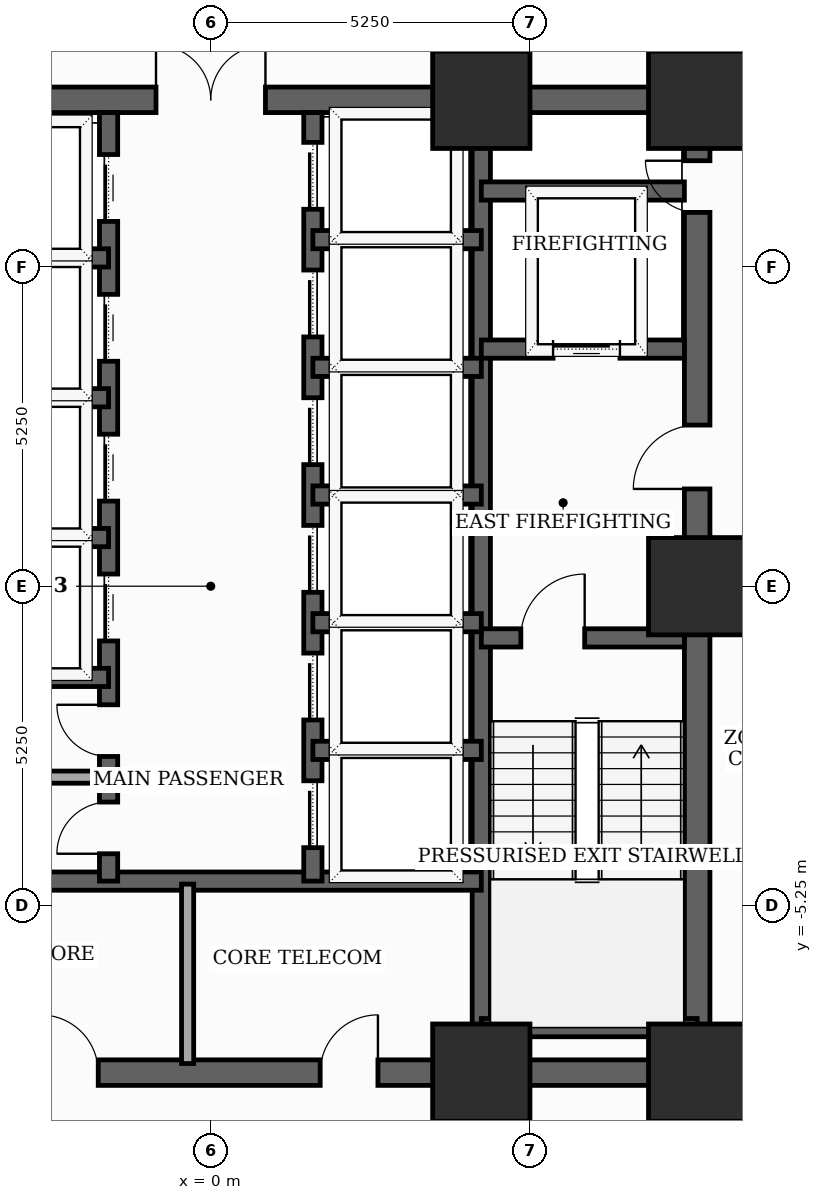
"""IFC4 building model, lengths in metres.
Left out: names, types, materials, properties, quantities, classifications, styles, units other than length and angle.
Written with IfcOpenShell. Run it as: python <this file> out.ifc"""

import sys

from ifc_helpers import new_model, si_unit, direction, frame, frame_2d, origin, origin_2d, place, context, subcontext, project, spatial, rectangle, extrude, element, fill, save


model = new_model("IFC4")
c1 = context("Model", 3, precision=1e-05, world=origin(), true_north=direction((0.0, 1.0)))
c2 = subcontext(c1, "Body", "Model", "MODEL_VIEW")
j1 = project(units=[si_unit("LENGTHUNIT", "METRE"), si_unit("PLANEANGLEUNIT", "RADIAN")], contexts=[c1])
p1 = place(None, origin())
s1 = spatial("IfcSite", under=j1, at=p1, CompositionType="ELEMENT")
p2 = place(p1, origin())
s2 = spatial("IfcBuilding", under=s1, at=p2, CompositionType="ELEMENT")
p3 = place(p2, frame((0.0, 0.0, 37.1)))
s3 = spatial("IfcBuildingStorey", under=s2, at=p3, CompositionType="ELEMENT", Elevation=37.1)
for number, where, z_axis, x_axis in (
    (1, (4.45, -8.0, 0.0), (0.0, 0.0, 1.0), (1.0, 0.0, 0.0)),
    (2, (8.0, -8.0, 0.0), (0.0, 0.0, 1.0), (1.0, 0.0, 0.0)),
    (3, (8.0, 0.0, 0.0), (0.0, 0.0, 1.0), (1.0, 0.0, 0.0)),
    (4, (8.0, 8.0, 0.0), (0.0, 0.0, 1.0), (1.0, 0.0, 0.0)),
    (5, (4.45, 8.0, 0.0), (0.0, 0.0, 1.0), (1.0, 0.0, 0.0)),
):
    element("IfcColumn", number, at=place(p3, frame(where, z_axis=z_axis, x_axis=x_axis)), inside=s3, PredefinedType="COLUMN", context=c2, shape_type="SweptSolid", body=[
        extrude(rectangle(XDim=1.6, YDim=1.6, at=origin_2d()), origin(), (0.0, 0.0, 1.0), 3.7),
    ])
p4 = place(p3, frame((8.0, -8.0, 0.0), z_axis=(0.0, 0.0, 1.0), x_axis=(0.0, 1.0, 0.0)))
e6 = element("IfcWall", 6, at=p4, inside=s3, PredefinedType="SHEAR", context=c2, shape_type="SweptSolid", body=[
    extrude(rectangle(XDim=16.0, YDim=0.42, at=frame_2d((8.0, 0.0))), origin(), (0.0, 0.0, 1.0), 3.5),
])
p5 = place(p4, frame((9.6, 0.0, 0.0)))
e7 = element("IfcOpeningElement", 7, at=p5, cuts=e6, PredefinedType="OPENING", context=c2, shape_type="SweptSolid", body=[
    extrude(rectangle(XDim=1.05, YDim=2.15, at=frame_2d((0.525, 1.075))), frame((0.0, 0.22, 0.0), z_axis=(0.0, -1.0, 0.0), x_axis=(1.0, 0.0, 0.0)), (0.0, 0.0, 1.0), 0.44),
])
p6 = place(p4, frame((14.148, 0.0, 0.0)))
e8 = element("IfcOpeningElement", 8, at=p6, cuts=e6, PredefinedType="OPENING", context=c2, shape_type="SweptSolid", body=[
    extrude(rectangle(XDim=0.85, YDim=2.02, at=frame_2d((0.425, 1.01))), frame((0.0, 0.22, 0.0), z_axis=(0.0, -1.0, 0.0), x_axis=(1.0, 0.0, 0.0)), (0.0, 0.0, 1.0), 0.44),
])
p7 = place(p3, frame((-8.0, -8.0, 0.0), z_axis=(0.0, 0.0, 1.0), x_axis=(1.0, 0.0, 0.0)))
e9 = element("IfcWall", 9, at=p7, inside=s3, PredefinedType="SHEAR", context=c2, shape_type="SweptSolid", body=[
    extrude(rectangle(XDim=16.0, YDim=0.42, at=frame_2d((8.0, 0.0))), origin(), (0.0, 0.0, 1.0), 3.5),
])
p8 = place(p7, frame((5.2, 0.0, 0.0)))
e10 = element("IfcOpeningElement", 10, at=p8, cuts=e9, PredefinedType="OPENING", context=c2, shape_type="SweptSolid", body=[
    extrude(rectangle(XDim=0.95, YDim=2.1, at=frame_2d((0.475, 1.05))), frame((0.0, 0.22, 0.0), z_axis=(0.0, -1.0, 0.0), x_axis=(1.0, 0.0, 0.0)), (0.0, 0.0, 1.0), 0.44),
])
p9 = place(p7, frame((9.8, 0.0, 0.0)))
e11 = element("IfcOpeningElement", 11, at=p9, cuts=e9, PredefinedType="OPENING", context=c2, shape_type="SweptSolid", body=[
    extrude(rectangle(XDim=0.95, YDim=2.1, at=frame_2d((0.475, 1.05))), frame((0.0, 0.22, 0.0), z_axis=(0.0, -1.0, 0.0), x_axis=(1.0, 0.0, 0.0)), (0.0, 0.0, 1.0), 0.44),
])
p10 = place(p3, frame((-8.0, 8.0, 0.0), z_axis=(0.0, 0.0, 1.0), x_axis=(1.0, 0.0, 0.0)))
e12 = element("IfcWall", 12, at=p10, inside=s3, PredefinedType="SHEAR", context=c2, shape_type="SweptSolid", body=[
    extrude(rectangle(XDim=16.0, YDim=0.42, at=frame_2d((8.0, 0.0))), origin(), (0.0, 0.0, 1.0), 3.5),
])
p11 = place(p10, frame((7.1, 0.0, 0.0)))
e13 = element("IfcOpeningElement", 13, at=p11, cuts=e12, PredefinedType="OPENING", context=c2, shape_type="SweptSolid", body=[
    extrude(rectangle(XDim=1.8, YDim=2.15, at=frame_2d((0.9, 1.075))), frame((0.0, 0.22, 0.0), z_axis=(0.0, -1.0, 0.0), x_axis=(1.0, 0.0, 0.0)), (0.0, 0.0, 1.0), 0.44),
])
p12 = place(p3, frame((4.45, -7.79, 0.0), z_axis=(0.0, 0.0, 1.0), x_axis=(0.0, 1.0, 0.0)))
e14 = element("IfcWall", 14, at=p12, inside=s3, PredefinedType="SHEAR", context=c2, shape_type="SweptSolid", body=[
    extrude(rectangle(XDim=15.58, YDim=0.3, at=frame_2d((7.79, 0.0))), origin(), (0.0, 0.0, 1.0), 3.5),
])
p13 = place(p3, frame((4.45, -0.85, 0.0), z_axis=(0.0, 0.0, 1.0), x_axis=(1.0, 0.0, 0.0)))
e15 = element("IfcWall", 15, at=p13, inside=s3, PredefinedType="SHEAR", context=c2, shape_type="SweptSolid", body=[
    extrude(rectangle(XDim=3.34, YDim=0.3, at=frame_2d((1.67, 0.0))), origin(), (0.0, 0.0, 1.0), 3.5),
])
p14 = place(p13, frame((0.65, 0.0, 0.0)))
e16 = element("IfcOpeningElement", 16, at=p14, cuts=e15, PredefinedType="OPENING", context=c2, shape_type="SweptSolid", body=[
    extrude(rectangle(XDim=1.05, YDim=2.15, at=frame_2d((0.525, 1.075))), frame((0.0, 0.16, 0.0), z_axis=(0.0, -1.0, 0.0), x_axis=(1.0, 0.0, 0.0)), (0.0, 0.0, 1.0), 0.32),
])
p15 = place(p3, frame((4.45, -7.26, 0.0), z_axis=(0.0, 0.0, 1.0), x_axis=(1.0, 0.0, 0.0)))
e17 = element("IfcWall", 17, at=p15, inside=s3, PredefinedType="SHEAR", context=c2, shape_type="SweptSolid", body=[
    extrude(rectangle(XDim=3.55, YDim=0.3, at=frame_2d((1.775, 0.0))), origin(), (0.0, 0.0, 1.0), 3.5),
])
p16 = place(p3, frame((4.45, 3.9, 0.0), z_axis=(0.0, 0.0, 1.0), x_axis=(1.0, 0.0, 0.0)))
e18 = element("IfcWall", 18, at=p16, inside=s3, PredefinedType="SHEAR", context=c2, shape_type="SweptSolid", body=[
    extrude(rectangle(XDim=3.34, YDim=0.3, at=frame_2d((1.67, 0.0))), origin(), (0.0, 0.0, 1.0), 3.5),
])
p17 = place(p16, frame((1.18, 0.0, 0.0)))
e19 = element("IfcOpeningElement", 19, at=p17, cuts=e18, PredefinedType="OPENING", context=c2, shape_type="SweptSolid", body=[
    extrude(rectangle(XDim=1.1, YDim=2.1, at=frame_2d((0.55, 1.05))), frame((0.0, 0.16, 0.0), z_axis=(0.0, -1.0, 0.0), x_axis=(1.0, 0.0, 0.0)), (0.0, 0.0, 1.0), 0.32),
])
p18 = place(p3, frame((4.45, 6.5, 0.0), z_axis=(0.0, 0.0, 1.0), x_axis=(1.0, 0.0, 0.0)))
e20 = element("IfcWall", 20, at=p18, inside=s3, PredefinedType="SHEAR", context=c2, shape_type="SweptSolid", body=[
    extrude(rectangle(XDim=3.34, YDim=0.3, at=frame_2d((1.67, 0.0))), origin(), (0.0, 0.0, 1.0), 3.5),
])
p19 = place(p3, frame((-4.45, -4.85, 0.0), z_axis=(0.0, 0.0, 1.0), x_axis=(1.0, 0.0, 0.0)))
e21 = element("IfcWall", 21, at=p19, inside=s3, PredefinedType="SHEAR", context=c2, shape_type="SweptSolid", body=[
    extrude(rectangle(XDim=8.9, YDim=0.3, at=frame_2d((4.45, 0.0))), origin(), (0.0, 0.0, 1.0), 3.5),
])
p20 = place(p3, frame((-1.68, -4.85, 0.0), z_axis=(0.0, 0.0, 1.0), x_axis=(0.0, 1.0, 0.0)))
e22 = element("IfcWall", 22, at=p20, inside=s3, PredefinedType="SHEAR", context=c2, shape_type="SweptSolid", body=[
    extrude(rectangle(XDim=12.64, YDim=0.3, at=frame_2d((6.32, 0.0))), origin(), (0.0, 0.0, 1.0), 3.5),
])
p21 = place(p20, frame((3.95, 0.0, 0.0)))
e23 = element("IfcOpeningElement", 23, at=p21, cuts=e22, PredefinedType="OPENING", context=c2, shape_type="SweptSolid", body=[
    extrude(rectangle(XDim=1.1, YDim=2.1, at=frame_2d((0.55, 1.05))), frame((0.0, 0.16, 0.0), z_axis=(0.0, -1.0, 0.0), x_axis=(1.0, 0.0, 0.0)), (0.0, 0.0, 1.0), 0.32),
])
p22 = place(p20, frame((6.25, 0.0, 0.0)))
e24 = element("IfcOpeningElement", 24, at=p22, cuts=e22, PredefinedType="OPENING", context=c2, shape_type="SweptSolid", body=[
    extrude(rectangle(XDim=1.1, YDim=2.1, at=frame_2d((0.55, 1.05))), frame((0.0, 0.16, 0.0), z_axis=(0.0, -1.0, 0.0), x_axis=(1.0, 0.0, 0.0)), (0.0, 0.0, 1.0), 0.32),
])
p23 = place(p20, frame((8.55, 0.0, 0.0)))
e25 = element("IfcOpeningElement", 25, at=p23, cuts=e22, PredefinedType="OPENING", context=c2, shape_type="SweptSolid", body=[
    extrude(rectangle(XDim=1.1, YDim=2.1, at=frame_2d((0.55, 1.05))), frame((0.0, 0.16, 0.0), z_axis=(0.0, -1.0, 0.0), x_axis=(1.0, 0.0, 0.0)), (0.0, 0.0, 1.0), 0.32),
])
p24 = place(p20, frame((10.85, 0.0, 0.0)))
e26 = element("IfcOpeningElement", 26, at=p24, cuts=e22, PredefinedType="OPENING", context=c2, shape_type="SweptSolid", body=[
    extrude(rectangle(XDim=1.1, YDim=2.1, at=frame_2d((0.55, 1.05))), frame((0.0, 0.16, 0.0), z_axis=(0.0, -1.0, 0.0), x_axis=(1.0, 0.0, 0.0)), (0.0, 0.0, 1.0), 0.32),
])
p25 = place(p20, frame((0.45, 0.0, 0.0)))
e27 = element("IfcOpeningElement", 27, at=p25, cuts=e22, PredefinedType="OPENING", context=c2, shape_type="SweptSolid", body=[
    extrude(rectangle(XDim=0.85, YDim=2.02, at=frame_2d((0.425, 1.01))), frame((0.0, 0.16, 0.0), z_axis=(0.0, -1.0, 0.0), x_axis=(1.0, 0.0, 0.0)), (0.0, 0.0, 1.0), 0.32),
])
p26 = place(p20, frame((2.05, 0.0, 0.0)))
e28 = element("IfcOpeningElement", 28, at=p26, cuts=e22, PredefinedType="OPENING", context=c2, shape_type="SweptSolid", body=[
    extrude(rectangle(XDim=0.85, YDim=2.02, at=frame_2d((0.425, 1.01))), frame((0.0, 0.16, 0.0), z_axis=(0.0, -1.0, 0.0), x_axis=(1.0, 0.0, 0.0)), (0.0, 0.0, 1.0), 0.32),
])
p27 = place(p3, frame((1.68, -4.85, 0.0), z_axis=(0.0, 0.0, 1.0), x_axis=(0.0, 1.0, 0.0)))
e29 = element("IfcWall", 29, at=p27, inside=s3, PredefinedType="SHEAR", context=c2, shape_type="SweptSolid", body=[
    extrude(rectangle(XDim=12.64, YDim=0.3, at=frame_2d((6.32, 0.0))), origin(), (0.0, 0.0, 1.0), 3.5),
])
p28 = place(p27, frame((0.55, 0.0, 0.0)))
e30 = element("IfcOpeningElement", 30, at=p28, cuts=e29, PredefinedType="OPENING", context=c2, shape_type="SweptSolid", body=[
    extrude(rectangle(XDim=1.1, YDim=2.1, at=frame_2d((0.55, 1.05))), frame((0.0, 0.16, 0.0), z_axis=(0.0, -1.0, 0.0), x_axis=(1.0, 0.0, 0.0)), (0.0, 0.0, 1.0), 0.32),
])
p29 = place(p27, frame((2.65, 0.0, 0.0)))
e31 = element("IfcOpeningElement", 31, at=p29, cuts=e29, PredefinedType="OPENING", context=c2, shape_type="SweptSolid", body=[
    extrude(rectangle(XDim=1.1, YDim=2.1, at=frame_2d((0.55, 1.05))), frame((0.0, 0.16, 0.0), z_axis=(0.0, -1.0, 0.0), x_axis=(1.0, 0.0, 0.0)), (0.0, 0.0, 1.0), 0.32),
])
p30 = place(p27, frame((4.75, 0.0, 0.0)))
e32 = element("IfcOpeningElement", 32, at=p30, cuts=e29, PredefinedType="OPENING", context=c2, shape_type="SweptSolid", body=[
    extrude(rectangle(XDim=1.1, YDim=2.1, at=frame_2d((0.55, 1.05))), frame((0.0, 0.16, 0.0), z_axis=(0.0, -1.0, 0.0), x_axis=(1.0, 0.0, 0.0)), (0.0, 0.0, 1.0), 0.32),
])
p31 = place(p27, frame((6.85, 0.0, 0.0)))
e33 = element("IfcOpeningElement", 33, at=p31, cuts=e29, PredefinedType="OPENING", context=c2, shape_type="SweptSolid", body=[
    extrude(rectangle(XDim=1.1, YDim=2.1, at=frame_2d((0.55, 1.05))), frame((0.0, 0.16, 0.0), z_axis=(0.0, -1.0, 0.0), x_axis=(1.0, 0.0, 0.0)), (0.0, 0.0, 1.0), 0.32),
])
p32 = place(p27, frame((8.95, 0.0, 0.0)))
e34 = element("IfcOpeningElement", 34, at=p32, cuts=e29, PredefinedType="OPENING", context=c2, shape_type="SweptSolid", body=[
    extrude(rectangle(XDim=1.1, YDim=2.1, at=frame_2d((0.55, 1.05))), frame((0.0, 0.16, 0.0), z_axis=(0.0, -1.0, 0.0), x_axis=(1.0, 0.0, 0.0)), (0.0, 0.0, 1.0), 0.32),
])
p33 = place(p27, frame((11.05, 0.0, 0.0)))
e35 = element("IfcOpeningElement", 35, at=p33, cuts=e29, PredefinedType="OPENING", context=c2, shape_type="SweptSolid", body=[
    extrude(rectangle(XDim=1.1, YDim=2.1, at=frame_2d((0.55, 1.05))), frame((0.0, 0.16, 0.0), z_axis=(0.0, -1.0, 0.0), x_axis=(1.0, 0.0, 0.0)), (0.0, 0.0, 1.0), 0.32),
])
for number, where, z_axis, x_axis in (
    (36, (-4.45, -1.5, 0.0), (0.0, 0.0, 1.0), (1.0, 0.0, 0.0)),
    (37, (-4.45, 0.8, 0.0), (0.0, 0.0, 1.0), (1.0, 0.0, 0.0)),
    (38, (-4.45, 3.1, 0.0), (0.0, 0.0, 1.0), (1.0, 0.0, 0.0)),
    (39, (-4.45, 5.4, 0.0), (0.0, 0.0, 1.0), (1.0, 0.0, 0.0)),
    (40, (1.68, 1.5, 0.0), (0.0, 0.0, 1.0), (1.0, 0.0, 0.0)),
    (41, (1.68, 3.6, 0.0), (0.0, 0.0, 1.0), (1.0, 0.0, 0.0)),
    (42, (1.68, 5.7, 0.0), (0.0, 0.0, 1.0), (1.0, 0.0, 0.0)),
    (43, (1.68, -2.7, 0.0), (0.0, 0.0, 1.0), (1.0, 0.0, 0.0)),
    (44, (1.68, -0.6, 0.0), (0.0, 0.0, 1.0), (1.0, 0.0, 0.0)),
):
    element("IfcWall", number, at=place(p3, frame(where, z_axis=z_axis, x_axis=x_axis)), inside=s3, PredefinedType="SHEAR", context=c2, shape_type="SweptSolid", body=[
        extrude(rectangle(XDim=2.77, YDim=0.3, at=frame_2d((1.385, 0.0))), origin(), (0.0, 0.0, 1.0), 3.5),
    ])
p34 = place(p3, frame((-0.38, -7.85, 0.0), z_axis=(0.0, 0.0, 1.0), x_axis=(0.0, 1.0, 0.0)))
e45 = element("IfcWall", 45, at=p34, inside=s3, PredefinedType="SOLIDWALL", context=c2, shape_type="SweptSolid", body=[
    extrude(rectangle(XDim=2.95, YDim=0.2, at=frame_2d((1.475, 0.0))), origin(), (0.0, 0.0, 1.0), 2.885),
])
p35 = place(p3, frame((-4.4, -3.14, 0.0), z_axis=(0.0, 0.0, 1.0), x_axis=(1.0, 0.0, 0.0)))
e46 = element("IfcWall", 46, at=p35, inside=s3, PredefinedType="SOLIDWALL", context=c2, shape_type="SweptSolid", body=[
    extrude(rectangle(XDim=2.68, YDim=0.2, at=frame_2d((1.34, 0.0))), origin(), (0.0, 0.0, 1.0), 3.5),
])
p36 = place(p5, origin())
e47 = element("IfcDoor", 47, at=p36, inside=s3, OperationType="SINGLE_SWING_LEFT", PredefinedType="DOOR", context=c2, shape_type="SweptSolid", body=[
    extrude(rectangle(XDim=1.05, YDim=2.15, at=frame_2d((0.525, 1.075))), frame((0.0, 0.025, 0.0), z_axis=(0.0, -1.0, 0.0), x_axis=(1.0, 0.0, 0.0)), (0.0, 0.0, 1.0), 0.05),
])
fill(e7, e47)
p37 = place(p6, origin())
e48 = element("IfcDoor", 48, at=p37, inside=s3, OperationType="SINGLE_SWING_RIGHT", PredefinedType="TRAPDOOR", context=c2, shape_type="SweptSolid", body=[
    extrude(rectangle(XDim=0.85, YDim=2.02, at=frame_2d((0.425, 1.01))), frame((0.0, 0.025, 0.0), z_axis=(0.0, -1.0, 0.0), x_axis=(1.0, 0.0, 0.0)), (0.0, 0.0, 1.0), 0.05),
])
fill(e8, e48)
p38 = place(p8, origin())
e49 = element("IfcDoor", 49, at=p38, inside=s3, OperationType="SINGLE_SWING_LEFT", PredefinedType="DOOR", context=c2, shape_type="SweptSolid", body=[
    extrude(rectangle(XDim=0.95, YDim=2.1, at=frame_2d((0.475, 1.05))), frame((0.0, 0.025, 0.0), z_axis=(0.0, -1.0, 0.0), x_axis=(1.0, 0.0, 0.0)), (0.0, 0.0, 1.0), 0.05),
])
fill(e10, e49)
p39 = place(p9, origin())
e50 = element("IfcDoor", 50, at=p39, inside=s3, OperationType="SINGLE_SWING_RIGHT", PredefinedType="DOOR", context=c2, shape_type="SweptSolid", body=[
    extrude(rectangle(XDim=0.95, YDim=2.1, at=frame_2d((0.475, 1.05))), frame((0.0, 0.025, 0.0), z_axis=(0.0, -1.0, 0.0), x_axis=(1.0, 0.0, 0.0)), (0.0, 0.0, 1.0), 0.05),
])
fill(e11, e50)
p40 = place(p11, origin())
e51 = element("IfcDoor", 51, at=p40, inside=s3, OperationType="DOUBLE_DOOR_SINGLE_SWING", PredefinedType="DOOR", context=c2, shape_type="SweptSolid", body=[
    extrude(rectangle(XDim=1.8, YDim=2.15, at=frame_2d((0.9, 1.075))), frame((0.0, 0.025, 0.0), z_axis=(0.0, -1.0, 0.0), x_axis=(1.0, 0.0, 0.0)), (0.0, 0.0, 1.0), 0.05),
])
fill(e13, e51)
p41 = place(p14, origin())
e52 = element("IfcDoor", 52, at=p41, inside=s3, OperationType="SINGLE_SWING_RIGHT", PredefinedType="DOOR", context=c2, shape_type="SweptSolid", body=[
    extrude(rectangle(XDim=1.05, YDim=2.15, at=frame_2d((0.525, 1.075))), frame((0.0, 0.025, 0.0), z_axis=(0.0, -1.0, 0.0), x_axis=(1.0, 0.0, 0.0)), (0.0, 0.0, 1.0), 0.05),
])
fill(e16, e52)
p42 = place(p17, origin())
e53 = element("IfcDoor", 53, at=p42, inside=s3, OperationType="SLIDING_TO_LEFT", PredefinedType="DOOR", context=c2, shape_type="SweptSolid", body=[
    extrude(rectangle(XDim=1.1, YDim=2.1, at=frame_2d((0.55, 1.05))), frame((0.0, 0.025, 0.0), z_axis=(0.0, -1.0, 0.0), x_axis=(1.0, 0.0, 0.0)), (0.0, 0.0, 1.0), 0.05),
])
fill(e19, e53)
p43 = place(p21, origin())
e54 = element("IfcDoor", 54, at=p43, inside=s3, OperationType="SLIDING_TO_LEFT", PredefinedType="DOOR", context=c2, shape_type="SweptSolid", body=[
    extrude(rectangle(XDim=1.1, YDim=2.1, at=frame_2d((0.55, 1.05))), frame((0.0, 0.025, 0.0), z_axis=(0.0, -1.0, 0.0), x_axis=(1.0, 0.0, 0.0)), (0.0, 0.0, 1.0), 0.05),
])
fill(e23, e54)
p44 = place(p22, origin())
e55 = element("IfcDoor", 55, at=p44, inside=s3, OperationType="SLIDING_TO_LEFT", PredefinedType="DOOR", context=c2, shape_type="SweptSolid", body=[
    extrude(rectangle(XDim=1.1, YDim=2.1, at=frame_2d((0.55, 1.05))), frame((0.0, 0.025, 0.0), z_axis=(0.0, -1.0, 0.0), x_axis=(1.0, 0.0, 0.0)), (0.0, 0.0, 1.0), 0.05),
])
fill(e24, e55)
p45 = place(p23, origin())
e56 = element("IfcDoor", 56, at=p45, inside=s3, OperationType="SLIDING_TO_LEFT", PredefinedType="DOOR", context=c2, shape_type="SweptSolid", body=[
    extrude(rectangle(XDim=1.1, YDim=2.1, at=frame_2d((0.55, 1.05))), frame((0.0, 0.025, 0.0), z_axis=(0.0, -1.0, 0.0), x_axis=(1.0, 0.0, 0.0)), (0.0, 0.0, 1.0), 0.05),
])
fill(e25, e56)
p46 = place(p24, origin())
e57 = element("IfcDoor", 57, at=p46, inside=s3, OperationType="SLIDING_TO_LEFT", PredefinedType="DOOR", context=c2, shape_type="SweptSolid", body=[
    extrude(rectangle(XDim=1.1, YDim=2.1, at=frame_2d((0.55, 1.05))), frame((0.0, 0.025, 0.0), z_axis=(0.0, -1.0, 0.0), x_axis=(1.0, 0.0, 0.0)), (0.0, 0.0, 1.0), 0.05),
])
fill(e26, e57)
p47 = place(p25, origin())
e58 = element("IfcDoor", 58, at=p47, inside=s3, OperationType="SINGLE_SWING_LEFT", PredefinedType="TRAPDOOR", context=c2, shape_type="SweptSolid", body=[
    extrude(rectangle(XDim=0.85, YDim=2.02, at=frame_2d((0.425, 1.01))), frame((0.0, 0.025, 0.0), z_axis=(0.0, -1.0, 0.0), x_axis=(1.0, 0.0, 0.0)), (0.0, 0.0, 1.0), 0.05),
])
fill(e27, e58)
p48 = place(p26, origin())
e59 = element("IfcDoor", 59, at=p48, inside=s3, OperationType="SINGLE_SWING_RIGHT", PredefinedType="TRAPDOOR", context=c2, shape_type="SweptSolid", body=[
    extrude(rectangle(XDim=0.85, YDim=2.02, at=frame_2d((0.425, 1.01))), frame((0.0, 0.025, 0.0), z_axis=(0.0, -1.0, 0.0), x_axis=(1.0, 0.0, 0.0)), (0.0, 0.0, 1.0), 0.05),
])
fill(e28, e59)
p49 = place(p28, origin())
e60 = element("IfcDoor", 60, at=p49, inside=s3, OperationType="SLIDING_TO_LEFT", PredefinedType="DOOR", context=c2, shape_type="SweptSolid", body=[
    extrude(rectangle(XDim=1.1, YDim=2.1, at=frame_2d((0.55, 1.05))), frame((0.0, 0.025, 0.0), z_axis=(0.0, -1.0, 0.0), x_axis=(1.0, 0.0, 0.0)), (0.0, 0.0, 1.0), 0.05),
])
fill(e30, e60)
p50 = place(p29, origin())
e61 = element("IfcDoor", 61, at=p50, inside=s3, OperationType="SLIDING_TO_LEFT", PredefinedType="DOOR", context=c2, shape_type="SweptSolid", body=[
    extrude(rectangle(XDim=1.1, YDim=2.1, at=frame_2d((0.55, 1.05))), frame((0.0, 0.025, 0.0), z_axis=(0.0, -1.0, 0.0), x_axis=(1.0, 0.0, 0.0)), (0.0, 0.0, 1.0), 0.05),
])
fill(e31, e61)
p51 = place(p30, origin())
e62 = element("IfcDoor", 62, at=p51, inside=s3, OperationType="SLIDING_TO_LEFT", PredefinedType="DOOR", context=c2, shape_type="SweptSolid", body=[
    extrude(rectangle(XDim=1.1, YDim=2.1, at=frame_2d((0.55, 1.05))), frame((0.0, 0.025, 0.0), z_axis=(0.0, -1.0, 0.0), x_axis=(1.0, 0.0, 0.0)), (0.0, 0.0, 1.0), 0.05),
])
fill(e32, e62)
p52 = place(p31, origin())
e63 = element("IfcDoor", 63, at=p52, inside=s3, OperationType="SLIDING_TO_LEFT", PredefinedType="DOOR", context=c2, shape_type="SweptSolid", body=[
    extrude(rectangle(XDim=1.1, YDim=2.1, at=frame_2d((0.55, 1.05))), frame((0.0, 0.025, 0.0), z_axis=(0.0, -1.0, 0.0), x_axis=(1.0, 0.0, 0.0)), (0.0, 0.0, 1.0), 0.05),
])
fill(e33, e63)
p53 = place(p32, origin())
e64 = element("IfcDoor", 64, at=p53, inside=s3, OperationType="SLIDING_TO_LEFT", PredefinedType="DOOR", context=c2, shape_type="SweptSolid", body=[
    extrude(rectangle(XDim=1.1, YDim=2.1, at=frame_2d((0.55, 1.05))), frame((0.0, 0.025, 0.0), z_axis=(0.0, -1.0, 0.0), x_axis=(1.0, 0.0, 0.0)), (0.0, 0.0, 1.0), 0.05),
])
fill(e34, e64)
p54 = place(p33, origin())
e65 = element("IfcDoor", 65, at=p54, inside=s3, OperationType="SLIDING_TO_LEFT", PredefinedType="DOOR", context=c2, shape_type="SweptSolid", body=[
    extrude(rectangle(XDim=1.1, YDim=2.1, at=frame_2d((0.55, 1.05))), frame((0.0, 0.025, 0.0), z_axis=(0.0, -1.0, 0.0), x_axis=(1.0, 0.0, 0.0)), (0.0, 0.0, 1.0), 0.05),
])
fill(e35, e65)
save(model, sys.argv[1])
